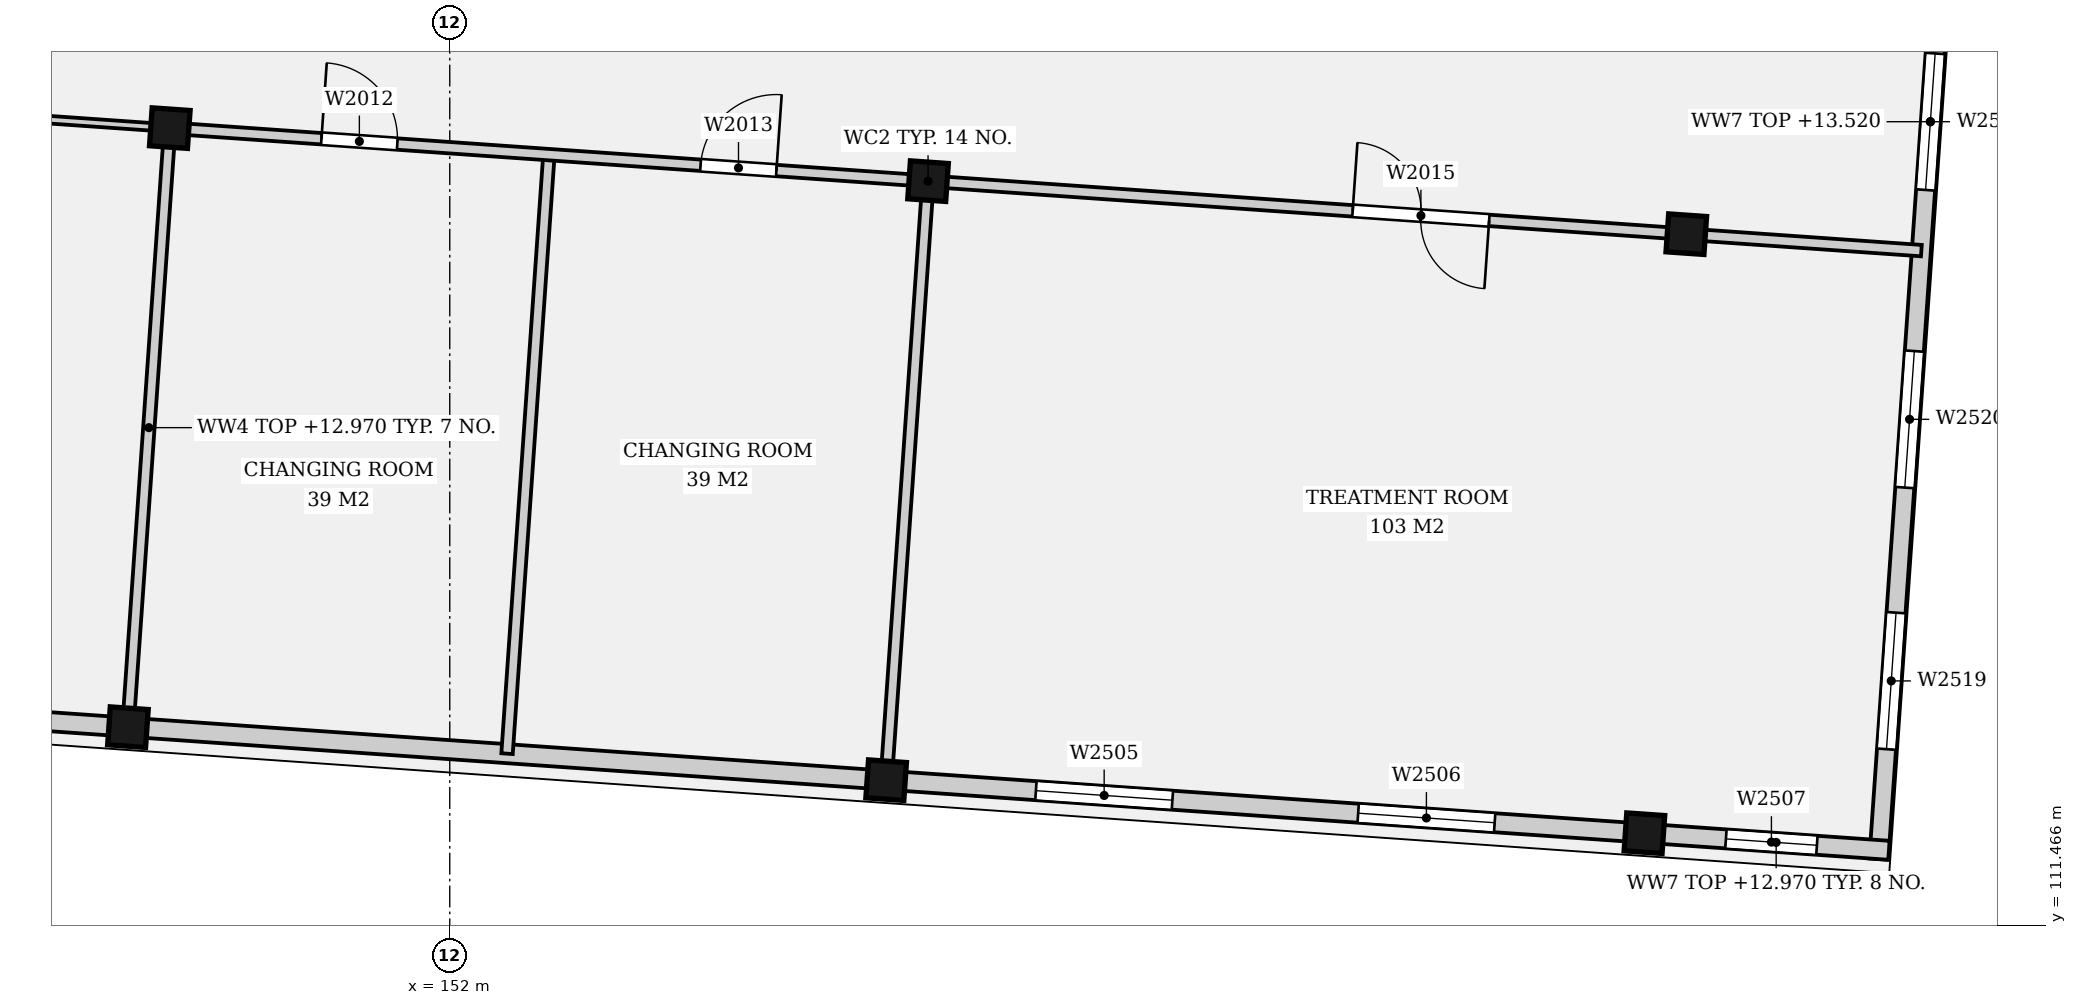
"""IFC4 building model, lengths in metres.
Left out: names, types, materials, properties, quantities, classifications, styles, units other than length and angle.
Written with IfcOpenShell. Run it as: python <this file> out.ifc"""

import sys

from ifc_helpers import new_model, si_unit, direction, frame, frame_2d, origin, origin_2d, place, context, subcontext, project, spatial, rectangle, extrude, element, fill, save


model = new_model("IFC4")
c1 = context("Model", 3, precision=1e-05, world=origin(), true_north=direction((0.0, 1.0)))
c2 = subcontext(c1, "Body", "Model", "MODEL_VIEW")
j1 = project(units=[si_unit("LENGTHUNIT", "METRE"), si_unit("PLANEANGLEUNIT", "RADIAN")], contexts=[c1])
p1 = place(None, origin())
s1 = spatial("IfcSite", under=j1, at=p1, CompositionType="ELEMENT")
p2 = place(p1, origin())
s2 = spatial("IfcBuilding", under=s1, at=p2, CompositionType="ELEMENT")
p3 = place(p2, frame((0.0, 0.0, 9.4)))
s3 = spatial("IfcBuildingStorey", under=s2, at=p3, CompositionType="ELEMENT", Elevation=9.4)
for number, where, z_axis, x_axis in (
    (1, (147.766, 114.075, 0.0), (0.0, 0.0, 1.0), (0.998, -0.07, 0.0)),
    (2, (148.317, 121.956, 0.0), (0.0, 0.0, 1.0), (0.998, -0.07, 0.0)),
    (3, (157.741, 113.377, 0.0), (0.0, 0.0, 1.0), (0.998, -0.07, 0.0)),
    (4, (158.292, 121.258, 0.0), (0.0, 0.0, 1.0), (0.998, -0.07, 0.0)),
    (5, (167.717, 112.68, 0.0), (0.0, 0.0, 1.0), (0.998, -0.07, 0.0)),
    (6, (168.268, 120.561, 0.0), (0.0, 0.0, 1.0), (0.998, -0.07, 0.0)),
):
    element("IfcColumn", number, at=place(p3, frame(where, z_axis=z_axis, x_axis=x_axis)), inside=s3, PredefinedType="COLUMN", context=c2, shape_type="SweptSolid", body=[
        extrude(rectangle(XDim=0.5, YDim=0.5, at=origin_2d()), origin(), (0.0, 0.0, 1.0), 4.4),
    ])
p4 = place(p3, frame((138.04, 114.755, 0.0), z_axis=(0.0, 0.0, 1.0), x_axis=(0.997564674448, -0.06974754686, 0.0)))
e7 = element("IfcWall", 7, at=p4, inside=s3, PredefinedType="SOLIDWALL", context=c2, shape_type="SweptSolid", body=[
    extrude(rectangle(XDim=9.5, YDim=0.25, at=frame_2d((4.75, 0.0))), origin(), (0.0, 0.0, 1.0), 3.57),
])
p5 = place(p4, frame((1.725, 0.0, 0.9)))
e8 = element("IfcOpeningElement", 8, at=p5, cuts=e7, PredefinedType="OPENING", context=c2, shape_type="SweptSolid", body=[
    extrude(rectangle(XDim=1.8, YDim=2.4, at=frame_2d((0.9, 1.2))), frame((0.0, 0.135, 0.0), z_axis=(0.0, -1.0, 0.0), x_axis=(1.0, 0.0, 0.0)), (0.0, 0.0, 1.0), 0.27),
])
p6 = place(p4, frame((5.975, 0.0, 0.9)))
e9 = element("IfcOpeningElement", 9, at=p6, cuts=e7, PredefinedType="OPENING", context=c2, shape_type="SweptSolid", body=[
    extrude(rectangle(XDim=1.8, YDim=2.4, at=frame_2d((0.9, 1.2))), frame((0.0, 0.135, 0.0), z_axis=(0.0, -1.0, 0.0), x_axis=(1.0, 0.0, 0.0)), (0.0, 0.0, 1.0), 0.27),
])
p7 = place(p3, frame((148.015, 114.057, 0.0), z_axis=(0.0, 0.0, 1.0), x_axis=(0.997564674448, -0.06974754686, 0.0)))
e10 = element("IfcWall", 10, at=p7, inside=s3, PredefinedType="SOLIDWALL", context=c2, shape_type="SweptSolid", body=[
    extrude(rectangle(XDim=9.5, YDim=0.25, at=frame_2d((4.75, 0.0))), origin(), (0.0, 0.0, 1.0), 3.57),
])
p8 = place(p3, frame((157.991, 113.36, 0.0), z_axis=(0.0, 0.0, 1.0), x_axis=(0.997563011141, -0.069771332249, 0.0)))
e11 = element("IfcWall", 11, at=p8, inside=s3, PredefinedType="SOLIDWALL", context=c2, shape_type="SweptSolid", body=[
    extrude(rectangle(XDim=9.5, YDim=0.25, at=frame_2d((4.75, 0.0))), origin(), (0.0, 0.0, 1.0), 3.57),
])
p9 = place(p8, frame((1.725, 0.0, 0.9)))
e12 = element("IfcOpeningElement", 12, at=p9, cuts=e11, PredefinedType="OPENING", context=c2, shape_type="SweptSolid", body=[
    extrude(rectangle(XDim=1.8, YDim=2.4, at=frame_2d((0.9, 1.2))), frame((0.0, 0.135, 0.0), z_axis=(0.0, -1.0, 0.0), x_axis=(1.0, 0.0, 0.0)), (0.0, 0.0, 1.0), 0.27),
])
p10 = place(p8, frame((5.975, 0.0, 0.9)))
e13 = element("IfcOpeningElement", 13, at=p10, cuts=e11, PredefinedType="OPENING", context=c2, shape_type="SweptSolid", body=[
    extrude(rectangle(XDim=1.8, YDim=2.4, at=frame_2d((0.9, 1.2))), frame((0.0, 0.135, 0.0), z_axis=(0.0, -1.0, 0.0), x_axis=(1.0, 0.0, 0.0)), (0.0, 0.0, 1.0), 0.27),
])
p11 = place(p3, frame((167.967, 112.662, 0.0), z_axis=(0.0, 0.0, 1.0), x_axis=(0.997558109536, -0.069841378134, 0.0)))
e14 = element("IfcWall", 14, at=p11, inside=s3, PredefinedType="SOLIDWALL", context=c2, shape_type="SweptSolid", body=[
    extrude(rectangle(XDim=2.975, YDim=0.25, at=frame_2d((1.487, 0.0))), origin(), (0.0, 0.0, 1.0), 3.57),
])
p12 = place(p11, frame((0.825, 0.0, 0.1)))
e15 = element("IfcOpeningElement", 15, at=p12, cuts=e14, PredefinedType="OPENING", context=c2, shape_type="SweptSolid", body=[
    extrude(rectangle(XDim=1.2, YDim=2.5, at=frame_2d((0.6, 1.25))), frame((0.0, 0.135, 0.0), z_axis=(0.0, -1.0, 0.0), x_axis=(1.0, 0.0, 0.0)), (0.0, 0.0, 1.0), 0.27),
])
p13 = place(p3, frame((170.801, 112.339, 0.0), z_axis=(0.0, 0.0, 1.0), x_axis=(0.069765298421, 0.997563433139, 0.0)))
e16 = element("IfcWall", 16, at=p13, inside=s3, PredefinedType="SOLIDWALL", context=c2, shape_type="SweptSolid", body=[
    extrude(rectangle(XDim=19.45, YDim=0.25, at=frame_2d((9.725, 0.0))), origin(), (0.0, 0.0, 1.0), 4.12),
])
p14 = place(p13, frame((1.45, 0.0, 0.9)))
e17 = element("IfcOpeningElement", 17, at=p14, cuts=e16, PredefinedType="OPENING", context=c2, shape_type="SweptSolid", body=[
    extrude(rectangle(XDim=1.8, YDim=2.4, at=frame_2d((0.9, 1.2))), frame((0.0, 0.135, 0.0), z_axis=(0.0, -1.0, 0.0), x_axis=(1.0, 0.0, 0.0)), (0.0, 0.0, 1.0), 0.27),
])
p15 = place(p13, frame((4.9, 0.0, 0.9)))
e18 = element("IfcOpeningElement", 18, at=p15, cuts=e16, PredefinedType="OPENING", context=c2, shape_type="SweptSolid", body=[
    extrude(rectangle(XDim=1.8, YDim=2.4, at=frame_2d((0.9, 1.2))), frame((0.0, 0.135, 0.0), z_axis=(0.0, -1.0, 0.0), x_axis=(1.0, 0.0, 0.0)), (0.0, 0.0, 1.0), 0.27),
])
p16 = place(p13, frame((8.825, 0.0, 0.9)))
e19 = element("IfcOpeningElement", 19, at=p16, cuts=e16, PredefinedType="OPENING", context=c2, shape_type="SweptSolid", body=[
    extrude(rectangle(XDim=1.8, YDim=2.4, at=frame_2d((0.9, 1.2))), frame((0.0, 0.135, 0.0), z_axis=(0.0, -1.0, 0.0), x_axis=(1.0, 0.0, 0.0)), (0.0, 0.0, 1.0), 0.27),
])
p17 = place(p13, frame((12.75, 0.0, 0.9)))
e20 = element("IfcOpeningElement", 20, at=p17, cuts=e16, PredefinedType="OPENING", context=c2, shape_type="SweptSolid", body=[
    extrude(rectangle(XDim=1.8, YDim=2.4, at=frame_2d((0.9, 1.2))), frame((0.0, 0.135, 0.0), z_axis=(0.0, -1.0, 0.0), x_axis=(1.0, 0.0, 0.0)), (0.0, 0.0, 1.0), 0.27),
])
p18 = place(p13, frame((16.2, 0.0, 0.9)))
e21 = element("IfcOpeningElement", 21, at=p18, cuts=e16, PredefinedType="OPENING", context=c2, shape_type="SweptSolid", body=[
    extrude(rectangle(XDim=1.8, YDim=2.4, at=frame_2d((0.9, 1.2))), frame((0.0, 0.135, 0.0), z_axis=(0.0, -1.0, 0.0), x_axis=(1.0, 0.0, 0.0)), (0.0, 0.0, 1.0), 0.27),
])
p19 = place(p3, frame((147.766, 114.075, 0.0), z_axis=(0.0, 0.0, 1.0), x_axis=(0.0697491702, 0.997564560947, 0.0)))
e22 = element("IfcWall", 22, at=p19, inside=s3, PredefinedType="PARTITIONING", context=c2, shape_type="SweptSolid", body=[
    extrude(rectangle(XDim=7.9, YDim=0.15, at=frame_2d((3.95, 0.0))), origin(), (0.0, 0.0, 1.0), 3.57),
])
p20 = place(p3, frame((152.754, 113.726, 0.0), z_axis=(0.0, 0.0, 1.0), x_axis=(0.069751320509, 0.997564410596, 0.0)))
e23 = element("IfcWall", 23, at=p20, inside=s3, PredefinedType="PARTITIONING", context=c2, shape_type="SweptSolid", body=[
    extrude(rectangle(XDim=7.9, YDim=0.15, at=frame_2d((3.95, 0.0))), origin(), (0.0, 0.0, 1.0), 3.57),
])
p21 = place(p3, frame((157.741, 113.377, 0.0), z_axis=(0.0, 0.0, 1.0), x_axis=(0.0697491702, 0.997564560947, 0.0)))
e24 = element("IfcWall", 24, at=p21, inside=s3, PredefinedType="PARTITIONING", context=c2, shape_type="SweptSolid", body=[
    extrude(rectangle(XDim=7.9, YDim=0.15, at=frame_2d((3.95, 0.0))), origin(), (0.0, 0.0, 1.0), 3.57),
])
p22 = place(p3, frame((128.365, 123.351, 0.0), z_axis=(0.0, 0.0, 1.0), x_axis=(0.997564465617, -0.069750533603, 0.0)))
e25 = element("IfcWall", 25, at=p22, inside=s3, PredefinedType="PARTITIONING", context=c2, shape_type="SweptSolid", body=[
    extrude(rectangle(XDim=20.0, YDim=0.1, at=frame_2d((10.0, 0.0))), origin(), (0.0, 0.0, 1.0), 3.57),
])
p23 = place(p22, frame((4.6, 0.0, 0.0)))
e26 = element("IfcOpeningElement", 26, at=p23, cuts=e25, PredefinedType="OPENING", context=c2, shape_type="SweptSolid", body=[
    extrude(rectangle(XDim=1.8, YDim=2.1, at=frame_2d((0.9, 1.05))), frame((0.0, 0.06, 0.0), z_axis=(0.0, -1.0, 0.0), x_axis=(1.0, 0.0, 0.0)), (0.0, 0.0, 1.0), 0.12),
])
p24 = place(p3, frame((148.317, 121.956, 0.0), z_axis=(0.0, 0.0, 1.0), x_axis=(0.997564184109, -0.06975455958, 0.0)))
e27 = element("IfcWall", 27, at=p24, inside=s3, PredefinedType="PARTITIONING", context=c2, shape_type="SweptSolid", body=[
    extrude(rectangle(XDim=23.1, YDim=0.15, at=frame_2d((11.55, 0.0))), origin(), (0.0, 0.0, 1.0), 3.57),
])
p25 = place(p24, frame((2.0, 0.0, 0.0)))
e28 = element("IfcOpeningElement", 28, at=p25, cuts=e27, PredefinedType="OPENING", context=c2, shape_type="SweptSolid", body=[
    extrude(rectangle(XDim=1.0, YDim=2.1, at=frame_2d((0.5, 1.05))), frame((0.0, 0.085, 0.0), z_axis=(0.0, -1.0, 0.0), x_axis=(1.0, 0.0, 0.0)), (0.0, 0.0, 1.0), 0.17),
])
p26 = place(p24, frame((7.0, 0.0, 0.0)))
e29 = element("IfcOpeningElement", 29, at=p26, cuts=e27, PredefinedType="OPENING", context=c2, shape_type="SweptSolid", body=[
    extrude(rectangle(XDim=1.0, YDim=2.1, at=frame_2d((0.5, 1.05))), frame((0.0, 0.085, 0.0), z_axis=(0.0, -1.0, 0.0), x_axis=(1.0, 0.0, 0.0)), (0.0, 0.0, 1.0), 0.17),
])
p27 = place(p24, frame((15.6, 0.0, 0.0)))
e30 = element("IfcOpeningElement", 30, at=p27, cuts=e27, PredefinedType="OPENING", context=c2, shape_type="SweptSolid", body=[
    extrude(rectangle(XDim=1.8, YDim=2.1, at=frame_2d((0.9, 1.05))), frame((0.0, 0.085, 0.0), z_axis=(0.0, -1.0, 0.0), x_axis=(1.0, 0.0, 0.0)), (0.0, 0.0, 1.0), 0.17),
])
p28 = place(p9, origin())
e31 = element("IfcWindow", 31, at=p28, inside=s3, PartitioningType="SINGLE_PANEL", PredefinedType="WINDOW", context=c2, shape_type="SweptSolid", body=[
    extrude(rectangle(XDim=1.8, YDim=2.4, at=frame_2d((0.9, 1.2))), frame((0.0, 0.03, 0.0), z_axis=(0.0, -1.0, 0.0), x_axis=(1.0, 0.0, 0.0)), (0.0, 0.0, 1.0), 0.06),
])
fill(e12, e31)
p29 = place(p10, origin())
e32 = element("IfcWindow", 32, at=p29, inside=s3, PartitioningType="SINGLE_PANEL", PredefinedType="WINDOW", context=c2, shape_type="SweptSolid", body=[
    extrude(rectangle(XDim=1.8, YDim=2.4, at=frame_2d((0.9, 1.2))), frame((0.0, 0.03, 0.0), z_axis=(0.0, -1.0, 0.0), x_axis=(1.0, 0.0, 0.0)), (0.0, 0.0, 1.0), 0.06),
])
fill(e13, e32)
p30 = place(p12, origin())
e33 = element("IfcWindow", 33, at=p30, inside=s3, PartitioningType="SINGLE_PANEL", PredefinedType="WINDOW", context=c2, shape_type="SweptSolid", body=[
    extrude(rectangle(XDim=1.2, YDim=2.5, at=frame_2d((0.6, 1.25))), frame((0.0, 0.03, 0.0), z_axis=(0.0, -1.0, 0.0), x_axis=(1.0, 0.0, 0.0)), (0.0, 0.0, 1.0), 0.06),
])
fill(e15, e33)
p31 = place(p14, origin())
e34 = element("IfcWindow", 34, at=p31, inside=s3, PartitioningType="SINGLE_PANEL", PredefinedType="WINDOW", context=c2, shape_type="SweptSolid", body=[
    extrude(rectangle(XDim=1.8, YDim=2.4, at=frame_2d((0.9, 1.2))), frame((0.0, 0.03, 0.0), z_axis=(0.0, -1.0, 0.0), x_axis=(1.0, 0.0, 0.0)), (0.0, 0.0, 1.0), 0.06),
])
fill(e17, e34)
p32 = place(p15, origin())
e35 = element("IfcWindow", 35, at=p32, inside=s3, PartitioningType="SINGLE_PANEL", PredefinedType="WINDOW", context=c2, shape_type="SweptSolid", body=[
    extrude(rectangle(XDim=1.8, YDim=2.4, at=frame_2d((0.9, 1.2))), frame((0.0, 0.03, 0.0), z_axis=(0.0, -1.0, 0.0), x_axis=(1.0, 0.0, 0.0)), (0.0, 0.0, 1.0), 0.06),
])
fill(e18, e35)
p33 = place(p16, origin())
e36 = element("IfcWindow", 36, at=p33, inside=s3, PartitioningType="SINGLE_PANEL", PredefinedType="WINDOW", context=c2, shape_type="SweptSolid", body=[
    extrude(rectangle(XDim=1.8, YDim=2.4, at=frame_2d((0.9, 1.2))), frame((0.0, 0.03, 0.0), z_axis=(0.0, -1.0, 0.0), x_axis=(1.0, 0.0, 0.0)), (0.0, 0.0, 1.0), 0.06),
])
fill(e19, e36)
p34 = place(p25, origin())
e37 = element("IfcDoor", 37, at=p34, inside=s3, OperationType="SINGLE_SWING_LEFT", PredefinedType="DOOR", context=c2, shape_type="SweptSolid", body=[
    extrude(rectangle(XDim=1.0, YDim=2.1, at=frame_2d((0.5, 1.05))), frame((0.0, 0.025, 0.0), z_axis=(0.0, -1.0, 0.0), x_axis=(1.0, 0.0, 0.0)), (0.0, 0.0, 1.0), 0.05),
])
fill(e28, e37)
p35 = place(p26, origin())
e38 = element("IfcDoor", 38, at=p35, inside=s3, OperationType="SINGLE_SWING_RIGHT", PredefinedType="DOOR", context=c2, shape_type="SweptSolid", body=[
    extrude(rectangle(XDim=1.0, YDim=2.1, at=frame_2d((0.5, 1.05))), frame((0.0, 0.025, 0.0), z_axis=(0.0, -1.0, 0.0), x_axis=(1.0, 0.0, 0.0)), (0.0, 0.0, 1.0), 0.05),
])
fill(e29, e38)
p36 = place(p27, origin())
e39 = element("IfcDoor", 39, at=p36, inside=s3, OperationType="DOUBLE_DOOR_SINGLE_SWING", PredefinedType="DOOR", context=c2, shape_type="SweptSolid", body=[
    extrude(rectangle(XDim=1.8, YDim=2.1, at=frame_2d((0.9, 1.05))), frame((0.0, 0.025, 0.0), z_axis=(0.0, -1.0, 0.0), x_axis=(1.0, 0.0, 0.0)), (0.0, 0.0, 1.0), 0.05),
])
fill(e30, e39)
save(model, sys.argv[1])
